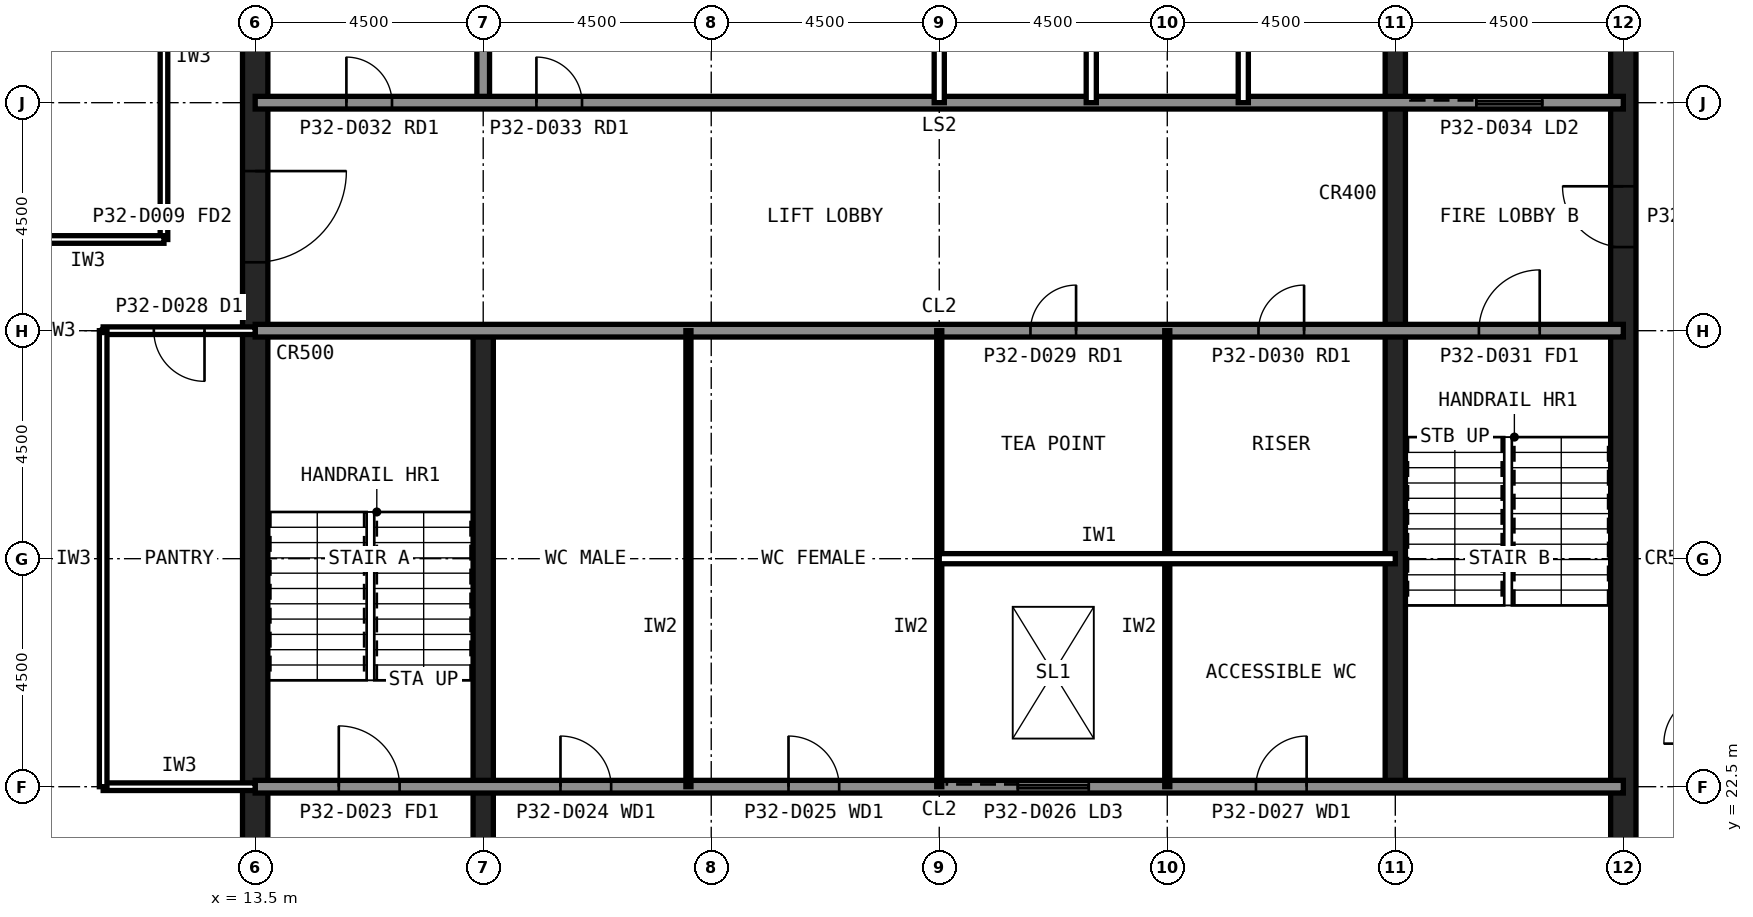
"""IFC4 building model, lengths in metres.
Left out: names, types, materials, properties, quantities, classifications, styles, units other than length and angle.
Written with IfcOpenShell. Run it as: python <this file> out.ifc"""

import sys

from ifc_helpers import new_model, si_unit, direction, frame, frame_2d, origin, place, context, subcontext, project, spatial, rectangle, extrude, element, fill, save


model = new_model("IFC4")
c1 = context("Model", 3, precision=1e-05, world=origin(), true_north=direction((0.0, 1.0)))
c2 = subcontext(c1, "Body", "Model", "MODEL_VIEW")
j1 = project(units=[si_unit("LENGTHUNIT", "METRE"), si_unit("PLANEANGLEUNIT", "RADIAN")], contexts=[c1])
p1 = place(None, origin())
s1 = spatial("IfcSite", under=j1, at=p1, CompositionType="ELEMENT")
p2 = place(p1, origin())
s2 = spatial("IfcBuilding", under=s1, at=p2, CompositionType="ELEMENT")
p3 = place(p2, frame((0.0, 0.0, 135.6)))
s3 = spatial("IfcBuildingStorey", under=s2, at=p3, CompositionType="ELEMENT", Elevation=135.6)
p4 = place(p3, frame((40.5, 13.5, 0.0), z_axis=(0.0, 0.0, 1.0), x_axis=(0.0, 1.0, 0.0)))
e1 = element("IfcWall", 1, at=p4, inside=s3, PredefinedType="SHEAR", context=c2, shape_type="SweptSolid", body=[
    extrude(rectangle(XDim=27.0, YDim=0.5, at=frame_2d((13.5, 0.0))), origin(), (0.0, 0.0, 1.0), 4.0),
])
p5 = place(p4, frame((5.85, 0.0, 0.0)))
e2 = element("IfcOpeningElement", 2, at=p5, cuts=e1, PredefinedType="OPENING", context=c2, shape_type="SweptSolid", body=[
    extrude(rectangle(XDim=1.8, YDim=2.1, at=frame_2d((0.9, 1.05))), frame((0.0, 0.26, 0.0), z_axis=(0.0, -1.0, 0.0), x_axis=(1.0, 0.0, 0.0)), (0.0, 0.0, 1.0), 0.52),
])
p6 = place(p4, frame((19.65, 0.0, 0.0)))
e3 = element("IfcOpeningElement", 3, at=p6, cuts=e1, PredefinedType="OPENING", context=c2, shape_type="SweptSolid", body=[
    extrude(rectangle(XDim=1.2, YDim=2.1, at=frame_2d((0.6, 1.05))), frame((0.0, 0.26, 0.0), z_axis=(0.0, -1.0, 0.0), x_axis=(1.0, 0.0, 0.0)), (0.0, 0.0, 1.0), 0.52),
])
p7 = place(p3, frame((13.5, 40.5, 0.0), z_axis=(0.0, 0.0, 1.0), x_axis=(0.0, -1.0, 0.0)))
e4 = element("IfcWall", 4, at=p7, inside=s3, PredefinedType="SHEAR", context=c2, shape_type="SweptSolid", body=[
    extrude(rectangle(XDim=27.0, YDim=0.5, at=frame_2d((13.5, 0.0))), origin(), (0.0, 0.0, 1.0), 4.0),
])
p8 = place(p7, frame((19.65, 0.0, 0.0)))
e5 = element("IfcOpeningElement", 5, at=p8, cuts=e4, PredefinedType="OPENING", context=c2, shape_type="SweptSolid", body=[
    extrude(rectangle(XDim=1.2, YDim=2.1, at=frame_2d((0.6, 1.05))), frame((0.0, 0.26, 0.0), z_axis=(0.0, -1.0, 0.0), x_axis=(1.0, 0.0, 0.0)), (0.0, 0.0, 1.0), 0.52),
])
p9 = place(p7, frame((5.85, 0.0, 0.0)))
e6 = element("IfcOpeningElement", 6, at=p9, cuts=e4, PredefinedType="OPENING", context=c2, shape_type="SweptSolid", body=[
    extrude(rectangle(XDim=1.8, YDim=2.1, at=frame_2d((0.9, 1.05))), frame((0.0, 0.26, 0.0), z_axis=(0.0, -1.0, 0.0), x_axis=(1.0, 0.0, 0.0)), (0.0, 0.0, 1.0), 0.52),
])
p10 = place(p3, frame((18.0, 13.5, 0.0), z_axis=(0.0, 0.0, 1.0), x_axis=(0.0, 1.0, 0.0)))
e7 = element("IfcWall", 7, at=p10, inside=s3, PredefinedType="SHEAR", context=c2, shape_type="SweptSolid", body=[
    extrude(rectangle(XDim=18.0, YDim=0.4, at=frame_2d((9.0, 0.0))), origin(), (0.0, 0.0, 1.0), 4.0),
])
p11 = place(p3, frame((18.0, 36.0, 0.0), z_axis=(0.0, 0.0, 1.0), x_axis=(0.0, 1.0, 0.0)))
e8 = element("IfcWall", 8, at=p11, inside=s3, PredefinedType="SOLIDWALL", context=c2, shape_type="SweptSolid", body=[
    extrude(rectangle(XDim=4.5, YDim=0.25, at=frame_2d((2.25, 0.0))), origin(), (0.0, 0.0, 1.0), 3.84),
])
p12 = place(p3, frame((36.0, 22.5, 0.0), z_axis=(0.0, 0.0, 1.0), x_axis=(0.0, 1.0, 0.0)))
e9 = element("IfcWall", 9, at=p12, inside=s3, PredefinedType="SHEAR", context=c2, shape_type="SweptSolid", body=[
    extrude(rectangle(XDim=18.0, YDim=0.4, at=frame_2d((9.0, 0.0))), origin(), (0.0, 0.0, 1.0), 4.0),
])
p13 = place(p3, frame((13.5, 36.0, 0.0), z_axis=(0.0, 0.0, 1.0), x_axis=(1.0, 0.0, 0.0)))
e10 = element("IfcWall", 10, at=p13, inside=s3, PredefinedType="SOLIDWALL", context=c2, shape_type="SweptSolid", body=[
    extrude(rectangle(XDim=27.0, YDim=0.25, at=frame_2d((13.5, 0.0))), origin(), (0.0, 0.0, 1.0), 3.84),
])
p14 = place(p13, frame((1.8, 0.0, 0.0)))
e11 = element("IfcOpeningElement", 11, at=p14, cuts=e10, PredefinedType="OPENING", context=c2, shape_type="SweptSolid", body=[
    extrude(rectangle(XDim=0.9, YDim=2.1, at=frame_2d((0.45, 1.05))), frame((0.0, 0.135, 0.0), z_axis=(0.0, -1.0, 0.0), x_axis=(1.0, 0.0, 0.0)), (0.0, 0.0, 1.0), 0.27),
])
p15 = place(p13, frame((5.55, 0.0, 0.0)))
e12 = element("IfcOpeningElement", 12, at=p15, cuts=e10, PredefinedType="OPENING", context=c2, shape_type="SweptSolid", body=[
    extrude(rectangle(XDim=0.9, YDim=2.1, at=frame_2d((0.45, 1.05))), frame((0.0, 0.135, 0.0), z_axis=(0.0, -1.0, 0.0), x_axis=(1.0, 0.0, 0.0)), (0.0, 0.0, 1.0), 0.27),
])
p16 = place(p13, frame((8.55, 0.0, 0.0)))
e13 = element("IfcOpeningElement", 13, at=p16, cuts=e10, PredefinedType="OPENING", context=c2, shape_type="SweptSolid", body=[
    extrude(rectangle(XDim=0.9, YDim=2.1, at=frame_2d((0.45, 1.05))), frame((0.0, 0.135, 0.0), z_axis=(0.0, -1.0, 0.0), x_axis=(1.0, 0.0, 0.0)), (0.0, 0.0, 1.0), 0.27),
])
p17 = place(p13, frame((24.1, 0.0, 0.0)))
e14 = element("IfcOpeningElement", 14, at=p17, cuts=e10, PredefinedType="OPENING", context=c2, shape_type="SweptSolid", body=[
    extrude(rectangle(XDim=1.3, YDim=2.2, at=frame_2d((0.65, 1.1))), frame((0.0, 0.135, 0.0), z_axis=(0.0, -1.0, 0.0), x_axis=(1.0, 0.0, 0.0)), (0.0, 0.0, 1.0), 0.27),
])
p18 = place(p3, frame((13.5, 22.5, 0.0), z_axis=(0.0, 0.0, 1.0), x_axis=(1.0, 0.0, 0.0)))
e15 = element("IfcWall", 15, at=p18, inside=s3, PredefinedType="SOLIDWALL", context=c2, shape_type="SweptSolid", body=[
    extrude(rectangle(XDim=27.0, YDim=0.25, at=frame_2d((13.5, 0.0))), origin(), (0.0, 0.0, 1.0), 3.84),
])
p19 = place(p18, frame((1.65, 0.0, 0.0)))
e16 = element("IfcOpeningElement", 16, at=p19, cuts=e15, PredefinedType="OPENING", context=c2, shape_type="SweptSolid", body=[
    extrude(rectangle(XDim=1.2, YDim=2.1, at=frame_2d((0.6, 1.05))), frame((0.0, 0.135, 0.0), z_axis=(0.0, -1.0, 0.0), x_axis=(1.0, 0.0, 0.0)), (0.0, 0.0, 1.0), 0.27),
])
p20 = place(p18, frame((6.025, 0.0, 0.0)))
e17 = element("IfcOpeningElement", 17, at=p20, cuts=e15, PredefinedType="OPENING", context=c2, shape_type="SweptSolid", body=[
    extrude(rectangle(XDim=1.0, YDim=2.1, at=frame_2d((0.5, 1.05))), frame((0.0, 0.135, 0.0), z_axis=(0.0, -1.0, 0.0), x_axis=(1.0, 0.0, 0.0)), (0.0, 0.0, 1.0), 0.27),
])
p21 = place(p18, frame((10.525, 0.0, 0.0)))
e18 = element("IfcOpeningElement", 18, at=p21, cuts=e15, PredefinedType="OPENING", context=c2, shape_type="SweptSolid", body=[
    extrude(rectangle(XDim=1.0, YDim=2.1, at=frame_2d((0.5, 1.05))), frame((0.0, 0.135, 0.0), z_axis=(0.0, -1.0, 0.0), x_axis=(1.0, 0.0, 0.0)), (0.0, 0.0, 1.0), 0.27),
])
p22 = place(p18, frame((19.75, 0.0, 0.0)))
e19 = element("IfcOpeningElement", 19, at=p22, cuts=e15, PredefinedType="OPENING", context=c2, shape_type="SweptSolid", body=[
    extrude(rectangle(XDim=1.0, YDim=2.1, at=frame_2d((0.5, 1.05))), frame((0.0, 0.135, 0.0), z_axis=(0.0, -1.0, 0.0), x_axis=(1.0, 0.0, 0.0)), (0.0, 0.0, 1.0), 0.27),
])
p23 = place(p18, frame((15.05, 0.0, 0.0)))
e20 = element("IfcOpeningElement", 20, at=p23, cuts=e15, PredefinedType="OPENING", context=c2, shape_type="SweptSolid", body=[
    extrude(rectangle(XDim=1.4, YDim=2.4, at=frame_2d((0.7, 1.2))), frame((0.0, 0.135, 0.0), z_axis=(0.0, -1.0, 0.0), x_axis=(1.0, 0.0, 0.0)), (0.0, 0.0, 1.0), 0.27),
])
p24 = place(p3, frame((13.5, 31.5, 0.0), z_axis=(0.0, 0.0, 1.0), x_axis=(1.0, 0.0, 0.0)))
e21 = element("IfcWall", 21, at=p24, inside=s3, PredefinedType="SOLIDWALL", context=c2, shape_type="SweptSolid", body=[
    extrude(rectangle(XDim=27.0, YDim=0.25, at=frame_2d((13.5, 0.0))), origin(), (0.0, 0.0, 1.0), 3.84),
])
p25 = place(p24, frame((24.15, 0.0, 0.0)))
e22 = element("IfcOpeningElement", 22, at=p25, cuts=e21, PredefinedType="OPENING", context=c2, shape_type="SweptSolid", body=[
    extrude(rectangle(XDim=1.2, YDim=2.1, at=frame_2d((0.6, 1.05))), frame((0.0, 0.135, 0.0), z_axis=(0.0, -1.0, 0.0), x_axis=(1.0, 0.0, 0.0)), (0.0, 0.0, 1.0), 0.27),
])
p26 = place(p24, frame((15.3, 0.0, 0.0)))
e23 = element("IfcOpeningElement", 23, at=p26, cuts=e21, PredefinedType="OPENING", context=c2, shape_type="SweptSolid", body=[
    extrude(rectangle(XDim=0.9, YDim=2.1, at=frame_2d((0.45, 1.05))), frame((0.0, 0.135, 0.0), z_axis=(0.0, -1.0, 0.0), x_axis=(1.0, 0.0, 0.0)), (0.0, 0.0, 1.0), 0.27),
])
p27 = place(p24, frame((19.8, 0.0, 0.0)))
e24 = element("IfcOpeningElement", 24, at=p27, cuts=e21, PredefinedType="OPENING", context=c2, shape_type="SweptSolid", body=[
    extrude(rectangle(XDim=0.9, YDim=2.1, at=frame_2d((0.45, 1.05))), frame((0.0, 0.135, 0.0), z_axis=(0.0, -1.0, 0.0), x_axis=(1.0, 0.0, 0.0)), (0.0, 0.0, 1.0), 0.27),
])
for number, where, z_axis, x_axis in (
    (25, (21.0, 36.0, 0.0), (0.0, 0.0, 1.0), (0.0, 1.0, 0.0)),
    (26, (27.0, 36.0, 0.0), (0.0, 0.0, 1.0), (0.0, 1.0, 0.0)),
    (27, (30.0, 36.0, 0.0), (0.0, 0.0, 1.0), (0.0, 1.0, 0.0)),
    (28, (33.0, 36.0, 0.0), (0.0, 0.0, 1.0), (0.0, 1.0, 0.0)),
):
    element("IfcWall", number, at=place(p3, frame(where, z_axis=z_axis, x_axis=x_axis)), inside=s3, PredefinedType="PARTITIONING", context=c2, shape_type="SweptSolid", body=[
        extrude(rectangle(XDim=4.5, YDim=0.2, at=frame_2d((2.25, 0.0))), origin(), (0.0, 0.0, 1.0), 3.84),
    ])
for number, where, z_axis, x_axis in (
    (29, (22.05, 22.5, 0.0), (0.0, 0.0, 1.0), (0.0, 1.0, 0.0)),
    (30, (27.0, 22.5, 0.0), (0.0, 0.0, 1.0), (0.0, 1.0, 0.0)),
    (31, (31.5, 22.5, 0.0), (0.0, 0.0, 1.0), (0.0, 1.0, 0.0)),
):
    element("IfcWall", number, at=place(p3, frame(where, z_axis=z_axis, x_axis=x_axis)), inside=s3, PredefinedType="PLUMBINGWALL", context=c2, shape_type="SweptSolid", body=[
        extrude(rectangle(XDim=9.0, YDim=0.1, at=frame_2d((4.5, 0.0))), origin(), (0.0, 0.0, 1.0), 3.84),
    ])
p28 = place(p3, frame((27.0, 27.0, 0.0), z_axis=(0.0, 0.0, 1.0), x_axis=(1.0, 0.0, 0.0)))
e32 = element("IfcWall", 32, at=p28, inside=s3, PredefinedType="PARTITIONING", context=c2, shape_type="SweptSolid", body=[
    extrude(rectangle(XDim=9.0, YDim=0.2, at=frame_2d((4.5, 0.0))), origin(), (0.0, 0.0, 1.0), 3.84),
])
p29 = place(p3, frame((11.7, 42.3, 0.0), z_axis=(0.0, 0.0, 1.0), x_axis=(0.0, -1.0, 0.0)))
e33 = element("IfcWall", 33, at=p29, inside=s3, PredefinedType="PARTITIONING", context=c2, shape_type="SweptSolid", body=[
    extrude(rectangle(XDim=9.0, YDim=0.15, at=frame_2d((4.5, 0.0))), origin(), (0.0, 0.0, 1.0), 3.84),
])
p30 = place(p3, frame((11.7, 33.3, 0.0), z_axis=(0.0, 0.0, 1.0), x_axis=(-1.0, 0.0, 0.0)))
e34 = element("IfcWall", 34, at=p30, inside=s3, PredefinedType="PARTITIONING", context=c2, shape_type="SweptSolid", body=[
    extrude(rectangle(XDim=3.0, YDim=0.15, at=frame_2d((1.5, 0.0))), origin(), (0.0, 0.0, 1.0), 3.84),
])
p31 = place(p3, frame((10.5, 22.5, 0.0), z_axis=(0.0, 0.0, 1.0), x_axis=(1.0, 0.0, 0.0)))
e35 = element("IfcWall", 35, at=p31, inside=s3, PredefinedType="PARTITIONING", context=c2, shape_type="SweptSolid", body=[
    extrude(rectangle(XDim=3.0, YDim=0.15, at=frame_2d((1.5, 0.0))), origin(), (0.0, 0.0, 1.0), 2.989),
])
p32 = place(p3, frame((13.5, 31.5, 0.0), z_axis=(0.0, 0.0, 1.0), x_axis=(-1.0, 0.0, 0.0)))
e36 = element("IfcWall", 36, at=p32, inside=s3, PredefinedType="PARTITIONING", context=c2, shape_type="SweptSolid", body=[
    extrude(rectangle(XDim=3.0, YDim=0.15, at=frame_2d((1.5, 0.0))), origin(), (0.0, 0.0, 1.0), 2.989),
])
p33 = place(p32, frame((1.0, 0.0, 0.0)))
e37 = element("IfcOpeningElement", 37, at=p33, cuts=e36, PredefinedType="OPENING", context=c2, shape_type="SweptSolid", body=[
    extrude(rectangle(XDim=1.0, YDim=2.1, at=frame_2d((0.5, 1.05))), frame((0.0, 0.085, 0.0), z_axis=(0.0, -1.0, 0.0), x_axis=(1.0, 0.0, 0.0)), (0.0, 0.0, 1.0), 0.17),
])
p34 = place(p3, frame((10.5, 31.5, 0.0), z_axis=(0.0, 0.0, 1.0), x_axis=(0.0, -1.0, 0.0)))
e38 = element("IfcWall", 38, at=p34, inside=s3, PredefinedType="PARTITIONING", context=c2, shape_type="SweptSolid", body=[
    extrude(rectangle(XDim=9.0, YDim=0.15, at=frame_2d((4.5, 0.0))), origin(), (0.0, 0.0, 1.0), 3.84),
])
p35 = place(p9, origin())
e39 = element("IfcDoor", 39, at=p35, inside=s3, OperationType="SINGLE_SWING_LEFT", PredefinedType="DOOR", context=c2, shape_type="SweptSolid", body=[
    extrude(rectangle(XDim=1.8, YDim=2.1, at=frame_2d((0.9, 1.05))), frame((0.0, 0.025, 0.0), z_axis=(0.0, -1.0, 0.0), x_axis=(1.0, 0.0, 0.0)), (0.0, 0.0, 1.0), 0.05),
])
fill(e6, e39)
p36 = place(p6, origin())
e40 = element("IfcDoor", 40, at=p36, inside=s3, OperationType="SINGLE_SWING_RIGHT", PredefinedType="DOOR", context=c2, shape_type="SweptSolid", body=[
    extrude(rectangle(XDim=1.2, YDim=2.1, at=frame_2d((0.6, 1.05))), frame((0.0, 0.025, 0.0), z_axis=(0.0, -1.0, 0.0), x_axis=(1.0, 0.0, 0.0)), (0.0, 0.0, 1.0), 0.05),
])
fill(e3, e40)
p37 = place(p19, origin())
e41 = element("IfcDoor", 41, at=p37, inside=s3, OperationType="SINGLE_SWING_LEFT", PredefinedType="DOOR", context=c2, shape_type="SweptSolid", body=[
    extrude(rectangle(XDim=1.2, YDim=2.1, at=frame_2d((0.6, 1.05))), frame((0.0, 0.025, 0.0), z_axis=(0.0, -1.0, 0.0), x_axis=(1.0, 0.0, 0.0)), (0.0, 0.0, 1.0), 0.05),
])
fill(e16, e41)
p38 = place(p25, origin())
e42 = element("IfcDoor", 42, at=p38, inside=s3, OperationType="SINGLE_SWING_RIGHT", PredefinedType="DOOR", context=c2, shape_type="SweptSolid", body=[
    extrude(rectangle(XDim=1.2, YDim=2.1, at=frame_2d((0.6, 1.05))), frame((0.0, 0.025, 0.0), z_axis=(0.0, -1.0, 0.0), x_axis=(1.0, 0.0, 0.0)), (0.0, 0.0, 1.0), 0.05),
])
fill(e22, e42)
p39 = place(p20, origin())
e43 = element("IfcDoor", 43, at=p39, inside=s3, OperationType="SINGLE_SWING_LEFT", PredefinedType="DOOR", context=c2, shape_type="SweptSolid", body=[
    extrude(rectangle(XDim=1.0, YDim=2.1, at=frame_2d((0.5, 1.05))), frame((0.0, 0.025, 0.0), z_axis=(0.0, -1.0, 0.0), x_axis=(1.0, 0.0, 0.0)), (0.0, 0.0, 1.0), 0.05),
])
fill(e17, e43)
p40 = place(p21, origin())
e44 = element("IfcDoor", 44, at=p40, inside=s3, OperationType="SINGLE_SWING_LEFT", PredefinedType="DOOR", context=c2, shape_type="SweptSolid", body=[
    extrude(rectangle(XDim=1.0, YDim=2.1, at=frame_2d((0.5, 1.05))), frame((0.0, 0.025, 0.0), z_axis=(0.0, -1.0, 0.0), x_axis=(1.0, 0.0, 0.0)), (0.0, 0.0, 1.0), 0.05),
])
fill(e18, e44)
p41 = place(p22, origin())
e45 = element("IfcDoor", 45, at=p41, inside=s3, OperationType="SINGLE_SWING_RIGHT", PredefinedType="DOOR", context=c2, shape_type="SweptSolid", body=[
    extrude(rectangle(XDim=1.0, YDim=2.1, at=frame_2d((0.5, 1.05))), frame((0.0, 0.025, 0.0), z_axis=(0.0, -1.0, 0.0), x_axis=(1.0, 0.0, 0.0)), (0.0, 0.0, 1.0), 0.05),
])
fill(e19, e45)
p42 = place(p26, origin())
e46 = element("IfcDoor", 46, at=p42, inside=s3, OperationType="SINGLE_SWING_RIGHT", PredefinedType="DOOR", context=c2, shape_type="SweptSolid", body=[
    extrude(rectangle(XDim=0.9, YDim=2.1, at=frame_2d((0.45, 1.05))), frame((0.0, 0.025, 0.0), z_axis=(0.0, -1.0, 0.0), x_axis=(1.0, 0.0, 0.0)), (0.0, 0.0, 1.0), 0.05),
])
fill(e23, e46)
p43 = place(p27, origin())
e47 = element("IfcDoor", 47, at=p43, inside=s3, OperationType="SINGLE_SWING_RIGHT", PredefinedType="DOOR", context=c2, shape_type="SweptSolid", body=[
    extrude(rectangle(XDim=0.9, YDim=2.1, at=frame_2d((0.45, 1.05))), frame((0.0, 0.025, 0.0), z_axis=(0.0, -1.0, 0.0), x_axis=(1.0, 0.0, 0.0)), (0.0, 0.0, 1.0), 0.05),
])
fill(e24, e47)
p44 = place(p14, origin())
e48 = element("IfcDoor", 48, at=p44, inside=s3, OperationType="SINGLE_SWING_LEFT", PredefinedType="DOOR", context=c2, shape_type="SweptSolid", body=[
    extrude(rectangle(XDim=0.9, YDim=2.1, at=frame_2d((0.45, 1.05))), frame((0.0, 0.025, 0.0), z_axis=(0.0, -1.0, 0.0), x_axis=(1.0, 0.0, 0.0)), (0.0, 0.0, 1.0), 0.05),
])
fill(e11, e48)
p45 = place(p15, origin())
e49 = element("IfcDoor", 49, at=p45, inside=s3, OperationType="SINGLE_SWING_LEFT", PredefinedType="DOOR", context=c2, shape_type="SweptSolid", body=[
    extrude(rectangle(XDim=0.9, YDim=2.1, at=frame_2d((0.45, 1.05))), frame((0.0, 0.025, 0.0), z_axis=(0.0, -1.0, 0.0), x_axis=(1.0, 0.0, 0.0)), (0.0, 0.0, 1.0), 0.05),
])
fill(e12, e49)
p46 = place(p16, origin())
e50 = element("IfcDoor", 50, at=p46, inside=s3, OperationType="SINGLE_SWING_LEFT", PredefinedType="DOOR", context=c2, shape_type="SweptSolid", body=[
    extrude(rectangle(XDim=0.9, YDim=2.1, at=frame_2d((0.45, 1.05))), frame((0.0, 0.025, 0.0), z_axis=(0.0, -1.0, 0.0), x_axis=(1.0, 0.0, 0.0)), (0.0, 0.0, 1.0), 0.05),
])
fill(e13, e50)
p47 = place(p17, origin())
e51 = element("IfcDoor", 51, at=p47, inside=s3, OperationType="SLIDING_TO_LEFT", PredefinedType="DOOR", context=c2, shape_type="SweptSolid", body=[
    extrude(rectangle(XDim=1.3, YDim=2.2, at=frame_2d((0.65, 1.1))), frame((0.0, 0.025, 0.0), z_axis=(0.0, -1.0, 0.0), x_axis=(1.0, 0.0, 0.0)), (0.0, 0.0, 1.0), 0.05),
])
fill(e14, e51)
p48 = place(p23, origin())
e52 = element("IfcDoor", 52, at=p48, inside=s3, OperationType="SLIDING_TO_LEFT", PredefinedType="DOOR", context=c2, shape_type="SweptSolid", body=[
    extrude(rectangle(XDim=1.4, YDim=2.4, at=frame_2d((0.7, 1.2))), frame((0.0, 0.025, 0.0), z_axis=(0.0, -1.0, 0.0), x_axis=(1.0, 0.0, 0.0)), (0.0, 0.0, 1.0), 0.05),
])
fill(e20, e52)
p49 = place(p33, origin())
e53 = element("IfcDoor", 53, at=p49, inside=s3, OperationType="SINGLE_SWING_LEFT", PredefinedType="DOOR", context=c2, shape_type="SweptSolid", body=[
    extrude(rectangle(XDim=1.0, YDim=2.1, at=frame_2d((0.5, 1.05))), frame((0.0, 0.025, 0.0), z_axis=(0.0, -1.0, 0.0), x_axis=(1.0, 0.0, 0.0)), (0.0, 0.0, 1.0), 0.05),
])
fill(e37, e53)
save(model, sys.argv[1])
